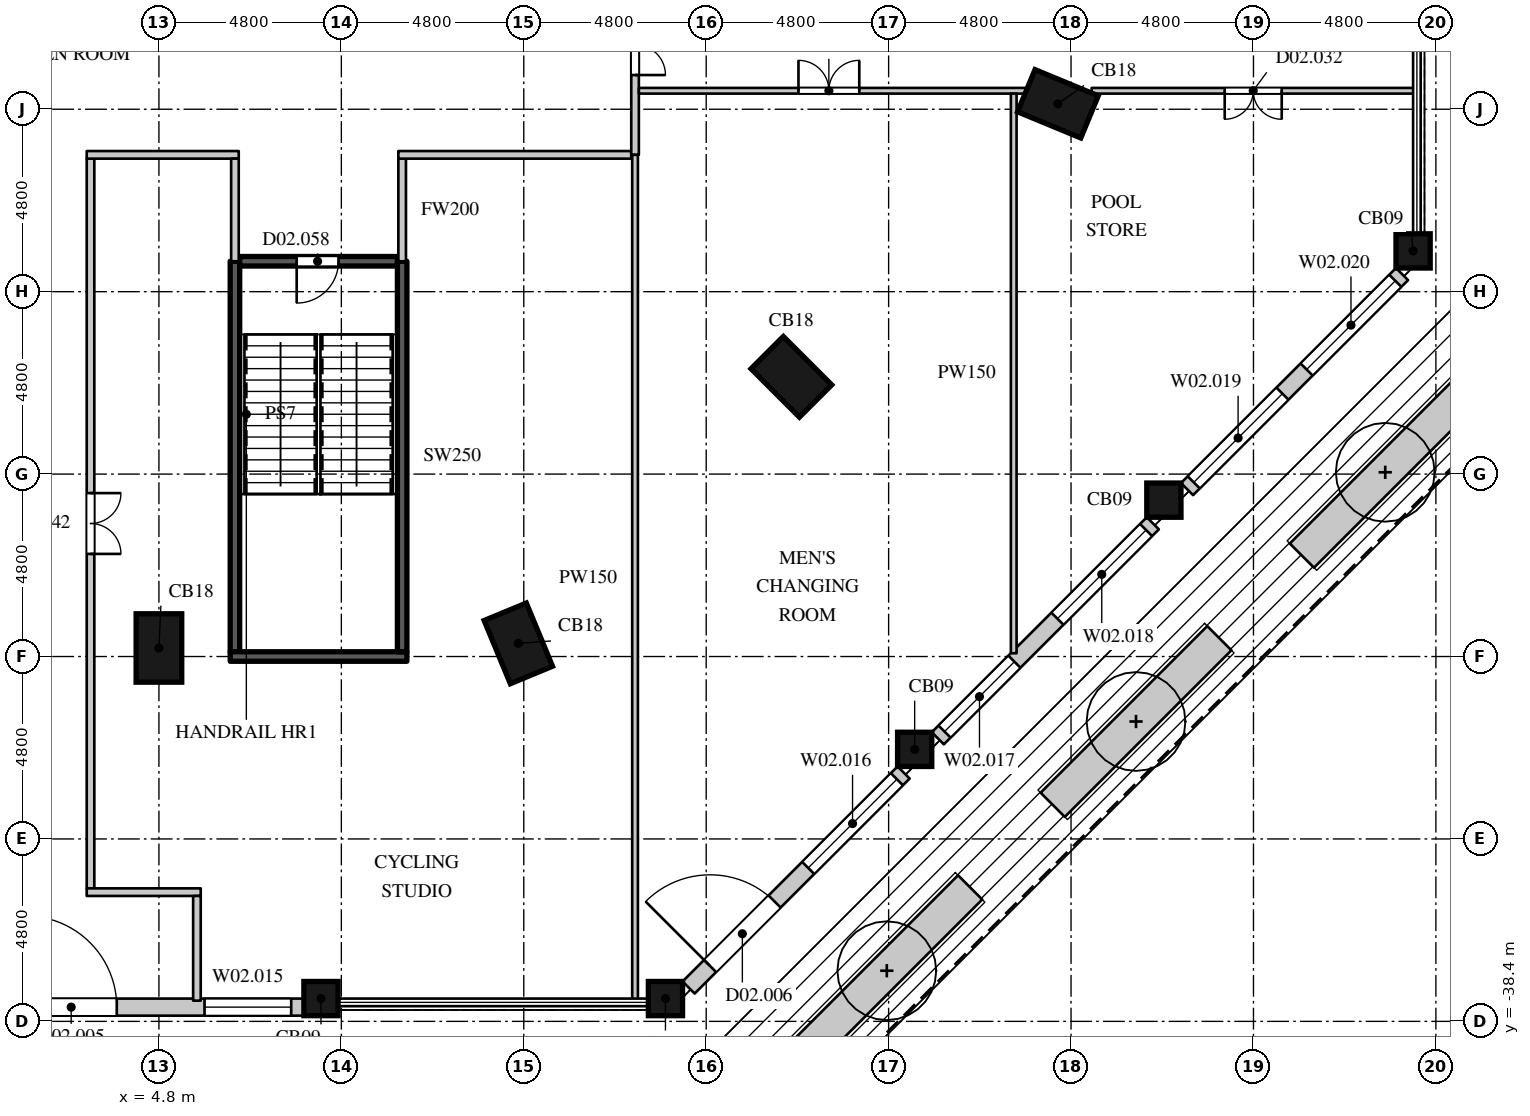
"""IFC4 building model, lengths in metres.
Left out: names, types, materials, properties, quantities, classifications, styles, units other than length and angle.
Written with IfcOpenShell. Run it as: python <this file> out.ifc"""

import sys

from ifc_helpers import new_model, si_unit, direction, frame, frame_2d, origin, origin_2d, place, context, subcontext, project, spatial, rectangle, extrude, element, fill, save


model = new_model("IFC4")
c1 = context("Model", 3, precision=1e-05, world=origin(), true_north=direction((0.0, 1.0)))
c2 = subcontext(c1, "Body", "Model", "MODEL_VIEW")
j1 = project(units=[si_unit("LENGTHUNIT", "METRE"), si_unit("PLANEANGLEUNIT", "RADIAN")], contexts=[c1])
p1 = place(None, origin())
s1 = spatial("IfcSite", under=j1, at=p1, CompositionType="ELEMENT")
p2 = place(p1, origin())
s2 = spatial("IfcBuilding", under=s1, at=p2, CompositionType="ELEMENT")
p3 = place(p2, frame((0.0, 0.0, 11.0)))
s3 = spatial("IfcBuildingStorey", under=s2, at=p3, CompositionType="ELEMENT", Elevation=11.0)
for number, where, z_axis, x_axis in (
    (1, (9.064, -37.8, 0.0), (0.0, 0.0, 1.0), (1.0, 0.0, 0.0)),
    (2, (18.128, -37.8, 0.0), (0.0, 0.0, 1.0), (1.0, 0.0, 0.0)),
    (3, (24.685, -31.243, 0.0), (0.0, 0.0, 1.0), (1.0, 0.0, 0.0)),
):
    element("IfcColumn", number, at=place(p3, frame(where, z_axis=z_axis, x_axis=x_axis)), inside=s3, PredefinedType="COLUMN", context=c2, shape_type="SweptSolid", body=[
        extrude(rectangle(XDim=0.9, YDim=0.9, at=origin_2d()), origin(), (0.0, 0.0, 1.0), 5.0),
    ])
for number, where, z_axis, x_axis in (
    (4, (4.8, -28.575, 0.0), (0.0, 0.0, 1.0), (1.0, 0.0, 0.0)),
    (5, (14.257, -28.454, 0.0), (0.0, 0.0, 1.0), (0.924, 0.383, 0.0)),
):
    element("IfcColumn", number, at=place(p3, frame(where, z_axis=z_axis, x_axis=x_axis)), inside=s3, PredefinedType="COLUMN", context=c2, shape_type="SweptSolid", body=[
        extrude(rectangle(XDim=1.2, YDim=1.8, at=origin_2d()), origin(), (0.0, 0.0, 1.0), 5.0),
    ])
p4 = place(p3, frame((31.243, -24.685, 0.0), z_axis=(0.0, 0.0, 1.0), x_axis=(1.0, 0.0, 0.0)))
e6 = element("IfcColumn", 6, at=p4, inside=s3, PredefinedType="COLUMN", context=c2, shape_type="SweptSolid", body=[
    extrude(rectangle(XDim=0.9, YDim=0.9, at=origin_2d()), origin(), (0.0, 0.0, 1.0), 5.0),
])
p5 = place(p3, frame((21.441, -21.441, 0.0), z_axis=(0.0, 0.0, 1.0), x_axis=(0.707106781187, 0.707106781187, 0.0)))
e7 = element("IfcColumn", 7, at=p5, inside=s3, PredefinedType="COLUMN", context=c2, shape_type="SweptSolid", body=[
    extrude(rectangle(XDim=1.2, YDim=1.8, at=origin_2d()), origin(), (0.0, 0.0, 1.0), 5.0),
])
p6 = place(p3, frame((37.8, -18.128, 0.0), z_axis=(0.0, 0.0, 1.0), x_axis=(1.0, 0.0, 0.0)))
e8 = element("IfcColumn", 8, at=p6, inside=s3, PredefinedType="COLUMN", context=c2, shape_type="SweptSolid", body=[
    extrude(rectangle(XDim=0.9, YDim=0.9, at=origin_2d()), origin(), (0.0, 0.0, 1.0), 5.0),
])
p7 = place(p3, frame((28.454, -14.257, 0.0), z_axis=(0.0, 0.0, 1.0), x_axis=(0.382683496864, 0.923879505795, 0.0)))
e9 = element("IfcColumn", 9, at=p7, inside=s3, PredefinedType="COLUMN", context=c2, shape_type="SweptSolid", body=[
    extrude(rectangle(XDim=1.2, YDim=1.8, at=origin_2d()), origin(), (0.0, 0.0, 1.0), 5.0),
])
p8 = place(p3, frame((0.45, -38.025, 0.0), z_axis=(0.0, 0.0, 1.0), x_axis=(1.0, 0.0, 0.0)))
e10 = element("IfcWall", 10, at=p8, inside=s3, PredefinedType="ELEMENTEDWALL", context=c2, shape_type="SweptSolid", body=[
    extrude(rectangle(XDim=8.164, YDim=0.45, at=frame_2d((4.082, 0.0))), origin(), (0.0, 0.0, 1.0), 3.8),
])
p9 = place(p8, frame((0.841, 0.0, 0.0)))
e11 = element("IfcOpeningElement", 11, at=p9, cuts=e10, PredefinedType="OPENING", context=c2, shape_type="SweptSolid", body=[
    extrude(rectangle(XDim=2.4, YDim=2.7, at=frame_2d((1.2, 1.35))), frame((0.0, 0.235, 0.0), z_axis=(0.0, -1.0, 0.0), x_axis=(1.0, 0.0, 0.0)), (0.0, 0.0, 1.0), 0.47),
])
p10 = place(p8, frame((5.55, 0.0, 1.05)))
e12 = element("IfcOpeningElement", 12, at=p10, cuts=e10, PredefinedType="OPENING", context=c2, shape_type="SweptSolid", body=[
    extrude(rectangle(XDim=2.28, YDim=2.7, at=frame_2d((1.14, 1.35))), frame((0.0, 0.235, 0.0), z_axis=(0.0, -1.0, 0.0), x_axis=(1.0, 0.0, 0.0)), (0.0, 0.0, 1.0), 0.47),
])
p11 = place(p3, frame((18.737, -37.509, 0.0), z_axis=(0.0, 0.0, 1.0), x_axis=(0.707106781187, 0.707106781187, 0.0)))
e13 = element("IfcWall", 13, at=p11, inside=s3, PredefinedType="ELEMENTEDWALL", context=c2, shape_type="SweptSolid", body=[
    extrude(rectangle(XDim=8.0, YDim=0.45, at=frame_2d((4.0, 0.0))), origin(), (0.0, 0.0, 1.0), 3.8),
])
p12 = place(p11, frame((0.8, 0.0, 0.0)))
e14 = element("IfcOpeningElement", 14, at=p12, cuts=e13, PredefinedType="OPENING", context=c2, shape_type="SweptSolid", body=[
    extrude(rectangle(XDim=2.4, YDim=2.7, at=frame_2d((1.2, 1.35))), frame((0.0, 0.235, 0.0), z_axis=(0.0, -1.0, 0.0), x_axis=(1.0, 0.0, 0.0)), (0.0, 0.0, 1.0), 0.47),
])
p13 = place(p11, frame((4.45, 0.0, 1.05)))
e15 = element("IfcOpeningElement", 15, at=p13, cuts=e13, PredefinedType="OPENING", context=c2, shape_type="SweptSolid", body=[
    extrude(rectangle(XDim=3.3, YDim=2.7, at=frame_2d((1.65, 1.35))), frame((0.0, 0.235, 0.0), z_axis=(0.0, -1.0, 0.0), x_axis=(1.0, 0.0, 0.0)), (0.0, 0.0, 1.0), 0.47),
])
p14 = place(p3, frame((25.294, -30.952, 0.0), z_axis=(0.0, 0.0, 1.0), x_axis=(0.707106781187, 0.707106781187, 0.0)))
e16 = element("IfcWall", 16, at=p14, inside=s3, PredefinedType="ELEMENTEDWALL", context=c2, shape_type="SweptSolid", body=[
    extrude(rectangle(XDim=8.0, YDim=0.45, at=frame_2d((4.0, 0.0))), origin(), (0.0, 0.0, 1.0), 3.8),
])
p15 = place(p14, frame((0.25, 0.0, 1.05)))
e17 = element("IfcOpeningElement", 17, at=p15, cuts=e16, PredefinedType="OPENING", context=c2, shape_type="SweptSolid", body=[
    extrude(rectangle(XDim=2.6, YDim=2.7, at=frame_2d((1.3, 1.35))), frame((0.0, 0.235, 0.0), z_axis=(0.0, -1.0, 0.0), x_axis=(1.0, 0.0, 0.0)), (0.0, 0.0, 1.0), 0.47),
])
p16 = place(p14, frame((4.45, 0.0, 1.05)))
e18 = element("IfcOpeningElement", 18, at=p16, cuts=e16, PredefinedType="OPENING", context=c2, shape_type="SweptSolid", body=[
    extrude(rectangle(XDim=3.3, YDim=2.7, at=frame_2d((1.65, 1.35))), frame((0.0, 0.235, 0.0), z_axis=(0.0, -1.0, 0.0), x_axis=(1.0, 0.0, 0.0)), (0.0, 0.0, 1.0), 0.47),
])
p17 = place(p3, frame((31.852, -24.394, 0.0), z_axis=(0.0, 0.0, 1.0), x_axis=(0.707106781187, 0.707106781187, 0.0)))
e19 = element("IfcWall", 19, at=p17, inside=s3, PredefinedType="ELEMENTEDWALL", context=c2, shape_type="SweptSolid", body=[
    extrude(rectangle(XDim=8.0, YDim=0.45, at=frame_2d((4.0, 0.0))), origin(), (0.0, 0.0, 1.0), 3.8),
])
p18 = place(p17, frame((0.25, 0.0, 1.05)))
e20 = element("IfcOpeningElement", 20, at=p18, cuts=e19, PredefinedType="OPENING", context=c2, shape_type="SweptSolid", body=[
    extrude(rectangle(XDim=3.3, YDim=2.7, at=frame_2d((1.65, 1.35))), frame((0.0, 0.235, 0.0), z_axis=(0.0, -1.0, 0.0), x_axis=(1.0, 0.0, 0.0)), (0.0, 0.0, 1.0), 0.47),
])
p19 = place(p17, frame((4.45, 0.0, 1.05)))
e21 = element("IfcOpeningElement", 21, at=p19, cuts=e19, PredefinedType="OPENING", context=c2, shape_type="SweptSolid", body=[
    extrude(rectangle(XDim=3.3, YDim=2.7, at=frame_2d((1.65, 1.35))), frame((0.0, 0.235, 0.0), z_axis=(0.0, -1.0, 0.0), x_axis=(1.0, 0.0, 0.0)), (0.0, 0.0, 1.0), 0.47),
])
p20 = place(p3, frame((21.76, -39.259, 0.0), z_axis=(0.0, 0.0, 1.0), x_axis=(0.707087094764, 0.707126467061, 0.0)))
e22 = element("IfcWall", 22, at=p20, inside=s3, PredefinedType="USERDEFINED", context=c2, shape_type="SweptSolid", body=[
    extrude(rectangle(XDim=6.201, YDim=0.9, at=frame_2d((3.101, 0.0))), origin(), (0.0, 0.0, 1.0), 0.9),
])
p21 = place(p3, frame((28.317, -32.702, 0.0), z_axis=(0.0, 0.0, 1.0), x_axis=(0.707106781187, 0.707106781187, 0.0)))
e23 = element("IfcWall", 23, at=p21, inside=s3, PredefinedType="USERDEFINED", context=c2, shape_type="SweptSolid", body=[
    extrude(rectangle(XDim=6.201, YDim=0.9, at=frame_2d((3.1, 0.0))), origin(), (0.0, 0.0, 1.0), 0.9),
])
p22 = place(p3, frame((34.875, -26.145, 0.0), z_axis=(0.0, 0.0, 1.0), x_axis=(0.707126467061, 0.707087094764, 0.0)))
e24 = element("IfcWall", 24, at=p22, inside=s3, PredefinedType="USERDEFINED", context=c2, shape_type="SweptSolid", body=[
    extrude(rectangle(XDim=6.201, YDim=0.9, at=frame_2d((3.101, 0.0))), origin(), (0.0, 0.0, 1.0), 0.9),
])
p23 = place(p3, frame((3.0, -34.9, 0.0), z_axis=(0.0, 0.0, 1.0), x_axis=(0.0, 1.0, 0.0)))
e25 = element("IfcWall", 25, at=p23, inside=s3, PredefinedType="PARTITIONING", context=c2, shape_type="SweptSolid", body=[
    extrude(rectangle(XDim=19.2, YDim=0.2, at=frame_2d((9.6, 0.0))), origin(), (0.0, 0.0, 1.0), 4.65),
])
p24 = place(p23, frame((8.8, 0.0, 0.0)))
e26 = element("IfcOpeningElement", 26, at=p24, cuts=e25, PredefinedType="OPENING", context=c2, shape_type="SweptSolid", body=[
    extrude(rectangle(XDim=1.6, YDim=2.4, at=frame_2d((0.8, 1.2))), frame((0.0, 0.11, 0.0), z_axis=(0.0, -1.0, 0.0), x_axis=(1.0, 0.0, 0.0)), (0.0, 0.0, 1.0), 0.22),
])
p25 = place(p3, frame((2.9, -35.0, 0.0), z_axis=(0.0, 0.0, 1.0), x_axis=(1.0, 0.0, 0.0)))
e27 = element("IfcWall", 27, at=p25, inside=s3, PredefinedType="PARTITIONING", context=c2, shape_type="SweptSolid", body=[
    extrude(rectangle(XDim=3.0, YDim=0.2, at=frame_2d((1.5, 0.0))), origin(), (0.0, 0.0, 1.0), 4.65),
])
p26 = place(p3, frame((2.9, -15.6, 0.0), z_axis=(0.0, 0.0, 1.0), x_axis=(1.0, 0.0, 0.0)))
e28 = element("IfcWall", 28, at=p26, inside=s3, PredefinedType="PARTITIONING", context=c2, shape_type="SweptSolid", body=[
    extrude(rectangle(XDim=4.0, YDim=0.2, at=frame_2d((2.0, 0.0))), origin(), (0.0, 0.0, 1.0), 4.65),
])
p27 = place(p3, frame((5.8, -37.855, 0.0), z_axis=(0.0, 0.0, 1.0), x_axis=(0.0, 1.0, 0.0)))
e29 = element("IfcWall", 29, at=p27, inside=s3, PredefinedType="PARTITIONING", context=c2, shape_type="SweptSolid", body=[
    extrude(rectangle(XDim=2.755, YDim=0.2, at=frame_2d((1.377, 0.0))), origin(), (0.0, 0.0, 1.0), 4.65),
])
for number, where, z_axis, x_axis in (
    (30, (6.8, -18.4, 0.0), (0.0, 0.0, 1.0), (0.0, 1.0, 0.0)),
    (31, (11.2, -18.4, 0.0), (0.0, 0.0, 1.0), (0.0, 1.0, 0.0)),
):
    element("IfcWall", number, at=place(p3, frame(where, z_axis=z_axis, x_axis=x_axis)), inside=s3, PredefinedType="PARTITIONING", context=c2, shape_type="SweptSolid", body=[
        extrude(rectangle(XDim=2.7, YDim=0.2, at=frame_2d((1.35, 0.0))), origin(), (0.0, 0.0, 1.0), 4.65),
    ])
p28 = place(p3, frame((11.1, -15.6, 0.0), z_axis=(0.0, 0.0, 1.0), x_axis=(1.0, 0.0, 0.0)))
e32 = element("IfcWall", 32, at=p28, inside=s3, PredefinedType="PARTITIONING", context=c2, shape_type="SweptSolid", body=[
    extrude(rectangle(XDim=6.128, YDim=0.2, at=frame_2d((3.064, 0.0))), origin(), (0.0, 0.0, 1.0), 4.65),
])
p29 = place(p3, frame((17.328, -15.6, 0.0), z_axis=(0.0, 0.0, 1.0), x_axis=(0.0, 1.0, 0.0)))
e33 = element("IfcWall", 33, at=p29, inside=s3, PredefinedType="PARTITIONING", context=c2, shape_type="SweptSolid", body=[
    extrude(rectangle(XDim=4.3, YDim=0.2, at=frame_2d((2.15, 0.0))), origin(), (0.0, 0.0, 1.0), 4.65),
])
p30 = place(p29, frame((2.1, 0.0, 0.0)))
e34 = element("IfcOpeningElement", 34, at=p30, cuts=e33, PredefinedType="OPENING", context=c2, shape_type="SweptSolid", body=[
    extrude(rectangle(XDim=1.6, YDim=2.4, at=frame_2d((0.8, 1.2))), frame((0.0, 0.11, 0.0), z_axis=(0.0, -1.0, 0.0), x_axis=(1.0, 0.0, 0.0)), (0.0, 0.0, 1.0), 0.22),
])
p31 = place(p3, frame((17.328, -37.855, 0.0), z_axis=(0.0, 0.0, 1.0), x_axis=(0.0, 1.0, 0.0)))
e35 = element("IfcWall", 35, at=p31, inside=s3, PredefinedType="PARTITIONING", context=c2, shape_type="SweptSolid", body=[
    extrude(rectangle(XDim=22.255, YDim=0.15, at=frame_2d((11.127, 0.0))), origin(), (0.0, 0.0, 1.0), 4.65),
])
p32 = place(p3, frame((17.428, -13.914, 0.0), z_axis=(0.0, 0.0, 1.0), x_axis=(1.0, 0.0, 0.0)))
e36 = element("IfcWall", 36, at=p32, inside=s3, PredefinedType="PARTITIONING", context=c2, shape_type="SweptSolid", body=[
    extrude(rectangle(XDim=10.174, YDim=0.15, at=frame_2d((5.087, 0.0))), origin(), (0.0, 0.0, 1.0), 4.65),
])
p33 = place(p32, frame((4.2, 0.0, 0.0)))
e37 = element("IfcOpeningElement", 37, at=p33, cuts=e36, PredefinedType="OPENING", context=c2, shape_type="SweptSolid", body=[
    extrude(rectangle(XDim=1.6, YDim=2.4, at=frame_2d((0.8, 1.2))), frame((0.0, 0.085, 0.0), z_axis=(0.0, -1.0, 0.0), x_axis=(1.0, 0.0, 0.0)), (0.0, 0.0, 1.0), 0.17),
])
p34 = place(p3, frame((29.343, -13.914, 0.0), z_axis=(0.0, 0.0, 1.0), x_axis=(1.0, 0.0, 0.0)))
e38 = element("IfcWall", 38, at=p34, inside=s3, PredefinedType="PARTITIONING", context=c2, shape_type="SweptSolid", body=[
    extrude(rectangle(XDim=8.512, YDim=0.15, at=frame_2d((4.256, 0.0))), origin(), (0.0, 0.0, 1.0), 4.65),
])
p35 = place(p34, frame((3.5, 0.0, 0.0)))
e39 = element("IfcOpeningElement", 39, at=p35, cuts=e38, PredefinedType="OPENING", context=c2, shape_type="SweptSolid", body=[
    extrude(rectangle(XDim=1.5, YDim=2.2, at=frame_2d((0.75, 1.1))), frame((0.0, 0.085, 0.0), z_axis=(0.0, -1.0, 0.0), x_axis=(1.0, 0.0, 0.0)), (0.0, 0.0, 1.0), 0.17),
])
p36 = place(p3, frame((27.292, -28.714, 0.0), z_axis=(0.0, 0.0, 1.0), x_axis=(0.0, 1.0, 0.0)))
e40 = element("IfcWall", 40, at=p36, inside=s3, PredefinedType="PARTITIONING", context=c2, shape_type="SweptSolid", body=[
    extrude(rectangle(XDim=14.725, YDim=0.15, at=frame_2d((7.363, 0.0))), origin(), (0.0, 0.0, 1.0), 4.65),
])
p37 = place(p3, frame((6.8, -28.675, 0.0), z_axis=(0.0, 0.0, 1.0), x_axis=(0.0, 1.0, 0.0)))
e41 = element("IfcWall", 41, at=p37, inside=s3, PredefinedType="SHEAR", context=c2, shape_type="SweptSolid", body=[
    extrude(rectangle(XDim=10.275, YDim=0.25, at=frame_2d((5.138, 0.0))), origin(), (0.0, 0.0, 1.0), 4.65),
])
p38 = place(p3, frame((6.675, -28.8, 0.0), z_axis=(0.0, 0.0, 1.0), x_axis=(1.0, 0.0, 0.0)))
e42 = element("IfcWall", 42, at=p38, inside=s3, PredefinedType="SHEAR", context=c2, shape_type="SweptSolid", body=[
    extrude(rectangle(XDim=4.65, YDim=0.25, at=frame_2d((2.325, 0.0))), origin(), (0.0, 0.0, 1.0), 4.65),
])
p39 = place(p3, frame((6.925, -18.4, 0.0), z_axis=(0.0, 0.0, 1.0), x_axis=(1.0, 0.0, 0.0)))
e43 = element("IfcWall", 43, at=p39, inside=s3, PredefinedType="SHEAR", context=c2, shape_type="SweptSolid", body=[
    extrude(rectangle(XDim=4.15, YDim=0.25, at=frame_2d((2.075, 0.0))), origin(), (0.0, 0.0, 1.0), 4.65),
])
p40 = place(p39, frame((1.5, 0.0, 0.0)))
e44 = element("IfcOpeningElement", 44, at=p40, cuts=e43, PredefinedType="OPENING", context=c2, shape_type="SweptSolid", body=[
    extrude(rectangle(XDim=1.1, YDim=2.2, at=frame_2d((0.55, 1.1))), frame((0.0, 0.135, 0.0), z_axis=(0.0, -1.0, 0.0), x_axis=(1.0, 0.0, 0.0)), (0.0, 0.0, 1.0), 0.27),
])
p41 = place(p3, frame((11.2, -28.675, 0.0), z_axis=(0.0, 0.0, 1.0), x_axis=(0.0, 1.0, 0.0)))
e45 = element("IfcWall", 45, at=p41, inside=s3, PredefinedType="SHEAR", context=c2, shape_type="SweptSolid", body=[
    extrude(rectangle(XDim=10.275, YDim=0.25, at=frame_2d((5.138, 0.0))), origin(), (0.0, 0.0, 1.0), 4.65),
])
p42 = place(p9, origin())
e46 = element("IfcDoor", 46, at=p42, inside=s3, OperationType="SINGLE_SWING_LEFT", PredefinedType="DOOR", context=c2, shape_type="SweptSolid", body=[
    extrude(rectangle(XDim=2.4, YDim=2.7, at=frame_2d((1.2, 1.35))), frame((0.0, 0.13, 0.0), z_axis=(0.0, -1.0, 0.0), x_axis=(1.0, 0.0, 0.0)), (0.0, 0.0, 1.0), 0.05),
])
fill(e11, e46)
p43 = place(p10, origin())
e47 = element("IfcWindow", 47, at=p43, inside=s3, PartitioningType="SINGLE_PANEL", PredefinedType="WINDOW", context=c2, shape_type="SweptSolid", body=[
    extrude(rectangle(XDim=2.28, YDim=2.7, at=frame_2d((1.14, 1.35))), frame((0.0, 0.135, 0.0), z_axis=(0.0, -1.0, 0.0), x_axis=(1.0, 0.0, 0.0)), (0.0, 0.0, 1.0), 0.06),
])
fill(e12, e47)
p44 = place(p12, origin())
e48 = element("IfcDoor", 48, at=p44, inside=s3, OperationType="SINGLE_SWING_LEFT", PredefinedType="DOOR", context=c2, shape_type="SweptSolid", body=[
    extrude(rectangle(XDim=2.4, YDim=2.7, at=frame_2d((1.2, 1.35))), frame((0.0, 0.13, 0.0), z_axis=(0.0, -1.0, 0.0), x_axis=(1.0, 0.0, 0.0)), (0.0, 0.0, 1.0), 0.05),
])
fill(e14, e48)
p45 = place(p13, origin())
e49 = element("IfcWindow", 49, at=p45, inside=s3, PartitioningType="SINGLE_PANEL", PredefinedType="WINDOW", context=c2, shape_type="SweptSolid", body=[
    extrude(rectangle(XDim=3.3, YDim=2.7, at=frame_2d((1.65, 1.35))), frame((0.0, 0.135, 0.0), z_axis=(0.0, -1.0, 0.0), x_axis=(1.0, 0.0, 0.0)), (0.0, 0.0, 1.0), 0.06),
])
fill(e15, e49)
p46 = place(p15, origin())
e50 = element("IfcWindow", 50, at=p46, inside=s3, PartitioningType="SINGLE_PANEL", PredefinedType="WINDOW", context=c2, shape_type="SweptSolid", body=[
    extrude(rectangle(XDim=2.6, YDim=2.7, at=frame_2d((1.3, 1.35))), frame((0.0, 0.135, 0.0), z_axis=(0.0, -1.0, 0.0), x_axis=(1.0, 0.0, 0.0)), (0.0, 0.0, 1.0), 0.06),
])
fill(e17, e50)
p47 = place(p16, origin())
e51 = element("IfcWindow", 51, at=p47, inside=s3, PartitioningType="SINGLE_PANEL", PredefinedType="WINDOW", context=c2, shape_type="SweptSolid", body=[
    extrude(rectangle(XDim=3.3, YDim=2.7, at=frame_2d((1.65, 1.35))), frame((0.0, 0.135, 0.0), z_axis=(0.0, -1.0, 0.0), x_axis=(1.0, 0.0, 0.0)), (0.0, 0.0, 1.0), 0.06),
])
fill(e18, e51)
p48 = place(p18, origin())
e52 = element("IfcWindow", 52, at=p48, inside=s3, PartitioningType="SINGLE_PANEL", PredefinedType="WINDOW", context=c2, shape_type="SweptSolid", body=[
    extrude(rectangle(XDim=3.3, YDim=2.7, at=frame_2d((1.65, 1.35))), frame((0.0, 0.135, 0.0), z_axis=(0.0, -1.0, 0.0), x_axis=(1.0, 0.0, 0.0)), (0.0, 0.0, 1.0), 0.06),
])
fill(e20, e52)
p49 = place(p19, origin())
e53 = element("IfcWindow", 53, at=p49, inside=s3, PartitioningType="SINGLE_PANEL", PredefinedType="WINDOW", context=c2, shape_type="SweptSolid", body=[
    extrude(rectangle(XDim=3.3, YDim=2.7, at=frame_2d((1.65, 1.35))), frame((0.0, 0.135, 0.0), z_axis=(0.0, -1.0, 0.0), x_axis=(1.0, 0.0, 0.0)), (0.0, 0.0, 1.0), 0.06),
])
fill(e21, e53)
p50 = place(p30, origin())
e54 = element("IfcDoor", 54, at=p50, inside=s3, OperationType="DOUBLE_DOOR_SINGLE_SWING", PredefinedType="DOOR", context=c2, shape_type="SweptSolid", body=[
    extrude(rectangle(XDim=1.6, YDim=2.4, at=frame_2d((0.8, 1.2))), frame((0.0, 0.025, 0.0), z_axis=(0.0, -1.0, 0.0), x_axis=(1.0, 0.0, 0.0)), (0.0, 0.0, 1.0), 0.05),
])
fill(e34, e54)
p51 = place(p33, origin())
e55 = element("IfcDoor", 55, at=p51, inside=s3, OperationType="DOUBLE_DOOR_SINGLE_SWING", PredefinedType="DOOR", context=c2, shape_type="SweptSolid", body=[
    extrude(rectangle(XDim=1.6, YDim=2.4, at=frame_2d((0.8, 1.2))), frame((0.0, 0.025, 0.0), z_axis=(0.0, -1.0, 0.0), x_axis=(1.0, 0.0, 0.0)), (0.0, 0.0, 1.0), 0.05),
])
fill(e37, e55)
p52 = place(p35, origin())
e56 = element("IfcDoor", 56, at=p52, inside=s3, OperationType="DOUBLE_DOOR_SINGLE_SWING", PredefinedType="DOOR", context=c2, shape_type="SweptSolid", body=[
    extrude(rectangle(XDim=1.5, YDim=2.2, at=frame_2d((0.75, 1.1))), frame((0.0, 0.025, 0.0), z_axis=(0.0, -1.0, 0.0), x_axis=(1.0, 0.0, 0.0)), (0.0, 0.0, 1.0), 0.05),
])
fill(e39, e56)
p53 = place(p24, origin())
e57 = element("IfcDoor", 57, at=p53, inside=s3, OperationType="DOUBLE_DOOR_SINGLE_SWING", PredefinedType="DOOR", context=c2, shape_type="SweptSolid", body=[
    extrude(rectangle(XDim=1.6, YDim=2.4, at=frame_2d((0.8, 1.2))), frame((0.0, 0.025, 0.0), z_axis=(0.0, -1.0, 0.0), x_axis=(1.0, 0.0, 0.0)), (0.0, 0.0, 1.0), 0.05),
])
fill(e26, e57)
p54 = place(p40, origin())
e58 = element("IfcDoor", 58, at=p54, inside=s3, OperationType="SINGLE_SWING_RIGHT", PredefinedType="DOOR", context=c2, shape_type="SweptSolid", body=[
    extrude(rectangle(XDim=1.1, YDim=2.2, at=frame_2d((0.55, 1.1))), frame((0.0, 0.025, 0.0), z_axis=(0.0, -1.0, 0.0), x_axis=(1.0, 0.0, 0.0)), (0.0, 0.0, 1.0), 0.05),
])
fill(e44, e58)
save(model, sys.argv[1])
